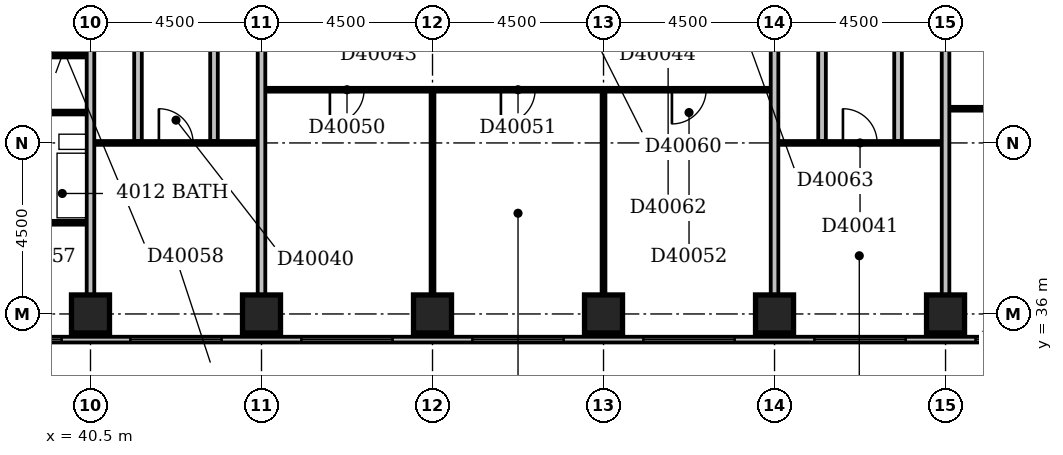
"""IFC4 building model, lengths in metres.
Left out: names, types, materials, properties, quantities, classifications, styles, units other than length and angle.
Written with IfcOpenShell. Run it as: python <this file> out.ifc"""

import sys

from ifc_helpers import new_model, si_unit, direction, frame, frame_2d, origin, origin_2d, place, context, subcontext, project, spatial, rectangle, extrude, element, fill, save


model = new_model("IFC4")
c1 = context("Model", 3, precision=1e-05, world=origin(), true_north=direction((0.0, 1.0)))
c2 = subcontext(c1, "Body", "Model", "MODEL_VIEW")
j1 = project(units=[si_unit("LENGTHUNIT", "METRE"), si_unit("PLANEANGLEUNIT", "RADIAN")], contexts=[c1])
p1 = place(None, origin())
s1 = spatial("IfcSite", under=j1, at=p1, CompositionType="ELEMENT")
p2 = place(p1, origin())
s2 = spatial("IfcBuilding", under=s1, at=p2, CompositionType="ELEMENT")
p3 = place(p2, frame((0.0, 0.0, 159.2)))
s3 = spatial("IfcBuildingStorey", under=s2, at=p3, CompositionType="ELEMENT", Elevation=159.2)
for number, where, z_axis, x_axis in (
    (1, (40.5, 36.0, -0.3), (0.0, 0.0, 1.0), (1.0, 0.0, 0.0)),
    (2, (45.0, 36.0, -0.3), (0.0, 0.0, 1.0), (1.0, 0.0, 0.0)),
    (3, (49.5, 36.0, -0.3), (0.0, 0.0, 1.0), (1.0, 0.0, 0.0)),
    (4, (54.0, 36.0, -0.3), (0.0, 0.0, 1.0), (1.0, 0.0, 0.0)),
    (5, (58.5, 36.0, -0.3), (0.0, 0.0, 1.0), (1.0, 0.0, 0.0)),
    (6, (63.0, 36.0, -0.3), (0.0, 0.0, 1.0), (1.0, 0.0, 0.0)),
):
    element("IfcColumn", number, at=place(p3, frame(where, z_axis=z_axis, x_axis=x_axis)), inside=s3, PredefinedType="COLUMN", context=c2, shape_type="SweptSolid", body=[
        extrude(rectangle(XDim=1.0, YDim=1.0, at=origin_2d()), origin(), (0.0, 0.0, 1.0), 3.6),
    ])
p4 = place(p3, frame((23.1, 35.325, 0.0), z_axis=(0.0, 0.0, 1.0), x_axis=(1.0, 0.0, 0.0)))
e7 = element("IfcWall", 7, at=p4, inside=s3, PredefinedType="STANDARD", context=c2, shape_type="SweptSolid", body=[
    extrude(rectangle(XDim=45.15, YDim=0.15, at=frame_2d((22.575, 0.0))), origin(), (0.0, 0.0, 1.0), 2.7),
])
p5 = place(p4, frame((0.45, 0.0, 0.6)))
e8 = element("IfcOpeningElement", 8, at=p5, cuts=e7, PredefinedType="OPENING", context=c2, shape_type="SweptSolid", body=[
    extrude(rectangle(XDim=2.4, YDim=1.8, at=frame_2d((1.2, 0.9))), frame((0.0, 0.087, 0.0), z_axis=(0.0, -1.0, 0.0), x_axis=(1.0, 0.0, 0.0)), (0.0, 0.0, 1.0), 0.174),
])
p6 = place(p4, frame((4.95, 0.0, 0.6)))
e9 = element("IfcOpeningElement", 9, at=p6, cuts=e7, PredefinedType="OPENING", context=c2, shape_type="SweptSolid", body=[
    extrude(rectangle(XDim=2.4, YDim=1.8, at=frame_2d((1.2, 0.9))), frame((0.0, 0.087, 0.0), z_axis=(0.0, -1.0, 0.0), x_axis=(1.0, 0.0, 0.0)), (0.0, 0.0, 1.0), 0.174),
])
p7 = place(p4, frame((9.22, 0.0, 0.6)))
e10 = element("IfcOpeningElement", 10, at=p7, cuts=e7, PredefinedType="OPENING", context=c2, shape_type="SweptSolid", body=[
    extrude(rectangle(XDim=1.8, YDim=1.8, at=frame_2d((0.9, 0.9))), frame((0.0, 0.087, 0.0), z_axis=(0.0, -1.0, 0.0), x_axis=(1.0, 0.0, 0.0)), (0.0, 0.0, 1.0), 0.174),
])
p8 = place(p4, frame((14.84, 0.0, 0.6)))
e11 = element("IfcOpeningElement", 11, at=p8, cuts=e7, PredefinedType="OPENING", context=c2, shape_type="SweptSolid", body=[
    extrude(rectangle(XDim=1.8, YDim=1.8, at=frame_2d((0.9, 0.9))), frame((0.0, 0.087, 0.0), z_axis=(0.0, -1.0, 0.0), x_axis=(1.0, 0.0, 0.0)), (0.0, 0.0, 1.0), 0.174),
])
p9 = place(p4, frame((18.45, 0.0, 0.6)))
e12 = element("IfcOpeningElement", 12, at=p9, cuts=e7, PredefinedType="OPENING", context=c2, shape_type="SweptSolid", body=[
    extrude(rectangle(XDim=2.4, YDim=1.8, at=frame_2d((1.2, 0.9))), frame((0.0, 0.087, 0.0), z_axis=(0.0, -1.0, 0.0), x_axis=(1.0, 0.0, 0.0)), (0.0, 0.0, 1.0), 0.174),
])
p10 = place(p4, frame((22.95, 0.0, 0.6)))
e13 = element("IfcOpeningElement", 13, at=p10, cuts=e7, PredefinedType="OPENING", context=c2, shape_type="SweptSolid", body=[
    extrude(rectangle(XDim=2.4, YDim=1.8, at=frame_2d((1.2, 0.9))), frame((0.0, 0.087, 0.0), z_axis=(0.0, -1.0, 0.0), x_axis=(1.0, 0.0, 0.0)), (0.0, 0.0, 1.0), 0.174),
])
p11 = place(p4, frame((27.45, 0.0, 0.6)))
e14 = element("IfcOpeningElement", 14, at=p11, cuts=e7, PredefinedType="OPENING", context=c2, shape_type="SweptSolid", body=[
    extrude(rectangle(XDim=2.4, YDim=1.8, at=frame_2d((1.2, 0.9))), frame((0.0, 0.087, 0.0), z_axis=(0.0, -1.0, 0.0), x_axis=(1.0, 0.0, 0.0)), (0.0, 0.0, 1.0), 0.174),
])
p12 = place(p4, frame((31.95, 0.0, 0.6)))
e15 = element("IfcOpeningElement", 15, at=p12, cuts=e7, PredefinedType="OPENING", context=c2, shape_type="SweptSolid", body=[
    extrude(rectangle(XDim=2.4, YDim=1.8, at=frame_2d((1.2, 0.9))), frame((0.0, 0.087, 0.0), z_axis=(0.0, -1.0, 0.0), x_axis=(1.0, 0.0, 0.0)), (0.0, 0.0, 1.0), 0.174),
])
p13 = place(p4, frame((36.45, 0.0, 0.6)))
e16 = element("IfcOpeningElement", 16, at=p13, cuts=e7, PredefinedType="OPENING", context=c2, shape_type="SweptSolid", body=[
    extrude(rectangle(XDim=2.4, YDim=1.8, at=frame_2d((1.2, 0.9))), frame((0.0, 0.087, 0.0), z_axis=(0.0, -1.0, 0.0), x_axis=(1.0, 0.0, 0.0)), (0.0, 0.0, 1.0), 0.174),
])
p14 = place(p4, frame((40.689, 0.0, 0.6)))
e17 = element("IfcOpeningElement", 17, at=p14, cuts=e7, PredefinedType="OPENING", context=c2, shape_type="SweptSolid", body=[
    extrude(rectangle(XDim=1.2, YDim=1.8, at=frame_2d((0.6, 0.9))), frame((0.0, 0.087, 0.0), z_axis=(0.0, -1.0, 0.0), x_axis=(1.0, 0.0, 0.0)), (0.0, 0.0, 1.0), 0.174),
])
p15 = place(p3, frame((40.5, 36.5, 0.0), z_axis=(0.0, 0.0, 1.0), x_axis=(0.0, 1.0, 0.0)))
e18 = element("IfcWall", 18, at=p15, inside=s3, PredefinedType="PARTITIONING", context=c2, shape_type="SweptSolid", body=[
    extrude(rectangle(XDim=12.9, YDim=0.2, at=frame_2d((6.45, 0.0))), origin(), (0.0, 0.0, 1.0), 3.3),
])
p16 = place(p3, frame((45.0, 36.5, 0.0), z_axis=(0.0, 0.0, 1.0), x_axis=(0.0, 1.0, 0.0)))
e19 = element("IfcWall", 19, at=p16, inside=s3, PredefinedType="PARTITIONING", context=c2, shape_type="SweptSolid", body=[
    extrude(rectangle(XDim=12.9, YDim=0.2, at=frame_2d((6.45, 0.0))), origin(), (0.0, 0.0, 1.0), 2.6),
])
p17 = place(p3, frame((49.5, 36.5, 0.0), z_axis=(0.0, 0.0, 1.0), x_axis=(0.0, 1.0, 0.0)))
e20 = element("IfcWall", 20, at=p17, inside=s3, PredefinedType="PARTITIONING", context=c2, shape_type="SweptSolid", body=[
    extrude(rectangle(XDim=5.35, YDim=0.1, at=frame_2d((2.675, 0.0))), origin(), (0.0, 0.0, 1.0), 3.3),
])
p18 = place(p3, frame((54.0, 36.5, 0.0), z_axis=(0.0, 0.0, 1.0), x_axis=(0.0, 1.0, 0.0)))
e21 = element("IfcWall", 21, at=p18, inside=s3, PredefinedType="PARTITIONING", context=c2, shape_type="SweptSolid", body=[
    extrude(rectangle(XDim=5.35, YDim=0.1, at=frame_2d((2.675, 0.0))), origin(), (0.0, 0.0, 1.0), 2.6),
])
p19 = place(p3, frame((58.5, 36.5, 0.0), z_axis=(0.0, 0.0, 1.0), x_axis=(0.0, 1.0, 0.0)))
e22 = element("IfcWall", 22, at=p19, inside=s3, PredefinedType="PARTITIONING", context=c2, shape_type="SweptSolid", body=[
    extrude(rectangle(XDim=12.9, YDim=0.2, at=frame_2d((6.45, 0.0))), origin(), (0.0, 0.0, 1.0), 3.3),
])
p20 = place(p3, frame((63.0, 36.5, 0.0), z_axis=(0.0, 0.0, 1.0), x_axis=(0.0, 1.0, 0.0)))
e23 = element("IfcWall", 23, at=p20, inside=s3, PredefinedType="PARTITIONING", context=c2, shape_type="SweptSolid", body=[
    extrude(rectangle(XDim=12.9, YDim=0.2, at=frame_2d((6.45, 0.0))), origin(), (0.0, 0.0, 1.0), 2.4),
])
p21 = place(p3, frame((38.25, 38.4, 0.0), z_axis=(0.0, 0.0, 1.0), x_axis=(1.0, 0.0, 0.0)))
e24 = element("IfcWall", 24, at=p21, inside=s3, PredefinedType="PLUMBINGWALL", context=c2, shape_type="SweptSolid", body=[
    extrude(rectangle(XDim=2.15, YDim=0.1, at=frame_2d((1.075, 0.0))), origin(), (0.0, 0.0, 1.0), 3.3),
])
p22 = place(p3, frame((40.6, 40.5, 0.0), z_axis=(0.0, 0.0, 1.0), x_axis=(1.0, 0.0, 0.0)))
e25 = element("IfcWall", 25, at=p22, inside=s3, PredefinedType="PARTITIONING", context=c2, shape_type="SweptSolid", body=[
    extrude(rectangle(XDim=4.3, YDim=0.1, at=frame_2d((2.15, 0.0))), origin(), (0.0, 0.0, 1.0), 3.3),
])
p23 = place(p22, frame((1.7, 0.0, 0.0)))
e26 = element("IfcOpeningElement", 26, at=p23, cuts=e25, PredefinedType="OPENING", context=c2, shape_type="SweptSolid", body=[
    extrude(rectangle(XDim=0.9, YDim=2.1, at=frame_2d((0.45, 1.05))), frame((0.0, 0.062, 0.0), z_axis=(0.0, -1.0, 0.0), x_axis=(1.0, 0.0, 0.0)), (0.0, 0.0, 1.0), 0.124),
])
p24 = place(p3, frame((58.6, 40.5, 0.0), z_axis=(0.0, 0.0, 1.0), x_axis=(1.0, 0.0, 0.0)))
e27 = element("IfcWall", 27, at=p24, inside=s3, PredefinedType="PARTITIONING", context=c2, shape_type="SweptSolid", body=[
    extrude(rectangle(XDim=4.3, YDim=0.1, at=frame_2d((2.15, 0.0))), origin(), (0.0, 0.0, 1.0), 3.3),
])
p25 = place(p24, frame((1.7, 0.0, 0.0)))
e28 = element("IfcOpeningElement", 28, at=p25, cuts=e27, PredefinedType="OPENING", context=c2, shape_type="SweptSolid", body=[
    extrude(rectangle(XDim=0.9, YDim=2.1, at=frame_2d((0.45, 1.05))), frame((0.0, 0.062, 0.0), z_axis=(0.0, -1.0, 0.0), x_axis=(1.0, 0.0, 0.0)), (0.0, 0.0, 1.0), 0.124),
])
p26 = place(p3, frame((41.75, 40.55, 0.0), z_axis=(0.0, 0.0, 1.0), x_axis=(0.0, 1.0, 0.0)))
e29 = element("IfcWall", 29, at=p26, inside=s3, PredefinedType="PARTITIONING", context=c2, shape_type="SweptSolid", body=[
    extrude(rectangle(XDim=8.95, YDim=0.2, at=frame_2d((4.475, 0.0))), origin(), (0.0, 0.0, 1.0), 3.3),
])
p27 = place(p26, frame((5.55, 0.0, 0.0)))
e30 = element("IfcOpeningElement", 30, at=p27, cuts=e29, PredefinedType="OPENING", context=c2, shape_type="SweptSolid", body=[
    extrude(rectangle(XDim=0.8, YDim=2.1, at=frame_2d((0.4, 1.05))), frame((0.0, 0.112, 0.0), z_axis=(0.0, -1.0, 0.0), x_axis=(1.0, 0.0, 0.0)), (0.0, 0.0, 1.0), 0.224),
])
p28 = place(p3, frame((43.75, 40.55, 0.0), z_axis=(0.0, 0.0, 1.0), x_axis=(0.0, 1.0, 0.0)))
e31 = element("IfcWall", 31, at=p28, inside=s3, PredefinedType="PARTITIONING", context=c2, shape_type="SweptSolid", body=[
    extrude(rectangle(XDim=8.95, YDim=0.2, at=frame_2d((4.475, 0.0))), origin(), (0.0, 0.0, 1.0), 3.3),
])
p29 = place(p28, frame((5.55, 0.0, 0.0)))
e32 = element("IfcOpeningElement", 32, at=p29, cuts=e31, PredefinedType="OPENING", context=c2, shape_type="SweptSolid", body=[
    extrude(rectangle(XDim=0.8, YDim=2.1, at=frame_2d((0.4, 1.05))), frame((0.0, 0.112, 0.0), z_axis=(0.0, -1.0, 0.0), x_axis=(1.0, 0.0, 0.0)), (0.0, 0.0, 1.0), 0.224),
])
p30 = place(p3, frame((59.75, 40.55, 0.0), z_axis=(0.0, 0.0, 1.0), x_axis=(0.0, 1.0, 0.0)))
e33 = element("IfcWall", 33, at=p30, inside=s3, PredefinedType="PARTITIONING", context=c2, shape_type="SweptSolid", body=[
    extrude(rectangle(XDim=8.95, YDim=0.2, at=frame_2d((4.475, 0.0))), origin(), (0.0, 0.0, 1.0), 3.3),
])
p31 = place(p30, frame((5.55, 0.0, 0.0)))
e34 = element("IfcOpeningElement", 34, at=p31, cuts=e33, PredefinedType="OPENING", context=c2, shape_type="SweptSolid", body=[
    extrude(rectangle(XDim=0.8, YDim=2.1, at=frame_2d((0.4, 1.05))), frame((0.0, 0.112, 0.0), z_axis=(0.0, -1.0, 0.0), x_axis=(1.0, 0.0, 0.0)), (0.0, 0.0, 1.0), 0.224),
])
p32 = place(p3, frame((61.75, 40.55, 0.0), z_axis=(0.0, 0.0, 1.0), x_axis=(0.0, 1.0, 0.0)))
e35 = element("IfcWall", 35, at=p32, inside=s3, PredefinedType="PARTITIONING", context=c2, shape_type="SweptSolid", body=[
    extrude(rectangle(XDim=8.95, YDim=0.2, at=frame_2d((4.475, 0.0))), origin(), (0.0, 0.0, 1.0), 3.3),
])
p33 = place(p32, frame((5.55, 0.0, 0.0)))
e36 = element("IfcOpeningElement", 36, at=p33, cuts=e35, PredefinedType="OPENING", context=c2, shape_type="SweptSolid", body=[
    extrude(rectangle(XDim=0.8, YDim=2.1, at=frame_2d((0.4, 1.05))), frame((0.0, 0.112, 0.0), z_axis=(0.0, -1.0, 0.0), x_axis=(1.0, 0.0, 0.0)), (0.0, 0.0, 1.0), 0.224),
])
p34 = place(p3, frame((22.6, 41.3, 0.0), z_axis=(0.0, 0.0, 1.0), x_axis=(1.0, 0.0, 0.0)))
e37 = element("IfcWall", 37, at=p34, inside=s3, PredefinedType="PARTITIONING", context=c2, shape_type="SweptSolid", body=[
    extrude(rectangle(XDim=17.8, YDim=0.1, at=frame_2d((8.9, 0.0))), origin(), (0.0, 0.0, 1.0), 3.3),
])
p35 = place(p34, frame((3.9, 0.0, 0.0)))
e38 = element("IfcOpeningElement", 38, at=p35, cuts=e37, PredefinedType="OPENING", context=c2, shape_type="SweptSolid", body=[
    extrude(rectangle(XDim=0.9, YDim=2.1, at=frame_2d((0.45, 1.05))), frame((0.0, 0.062, 0.0), z_axis=(0.0, -1.0, 0.0), x_axis=(1.0, 0.0, 0.0)), (0.0, 0.0, 1.0), 0.124),
])
p36 = place(p34, frame((10.7, 0.0, 0.0)))
e39 = element("IfcOpeningElement", 39, at=p36, cuts=e37, PredefinedType="OPENING", context=c2, shape_type="SweptSolid", body=[
    extrude(rectangle(XDim=0.9, YDim=2.1, at=frame_2d((0.45, 1.05))), frame((0.0, 0.062, 0.0), z_axis=(0.0, -1.0, 0.0), x_axis=(1.0, 0.0, 0.0)), (0.0, 0.0, 1.0), 0.124),
])
p37 = place(p34, frame((14.05, 0.0, 0.0)))
e40 = element("IfcOpeningElement", 40, at=p37, cuts=e37, PredefinedType="OPENING", context=c2, shape_type="SweptSolid", body=[
    extrude(rectangle(XDim=0.9, YDim=2.1, at=frame_2d((0.45, 1.05))), frame((0.0, 0.062, 0.0), z_axis=(0.0, -1.0, 0.0), x_axis=(1.0, 0.0, 0.0)), (0.0, 0.0, 1.0), 0.124),
])
p38 = place(p3, frame((63.1, 41.4, 0.0), z_axis=(0.0, 0.0, 1.0), x_axis=(1.0, 0.0, 0.0)))
e41 = element("IfcWall", 41, at=p38, inside=s3, PredefinedType="PARTITIONING", context=c2, shape_type="SweptSolid", body=[
    extrude(rectangle(XDim=5.0, YDim=0.1, at=frame_2d((2.5, 0.0))), origin(), (0.0, 0.0, 1.0), 3.3),
])
p39 = place(p38, frame((1.7, 0.0, 0.0)))
e42 = element("IfcOpeningElement", 42, at=p39, cuts=e41, PredefinedType="OPENING", context=c2, shape_type="SweptSolid", body=[
    extrude(rectangle(XDim=0.9, YDim=2.1, at=frame_2d((0.45, 1.05))), frame((0.0, 0.062, 0.0), z_axis=(0.0, -1.0, 0.0), x_axis=(1.0, 0.0, 0.0)), (0.0, 0.0, 1.0), 0.124),
])
p40 = place(p3, frame((45.1, 41.9, 0.0), z_axis=(0.0, 0.0, 1.0), x_axis=(1.0, 0.0, 0.0)))
e43 = element("IfcWall", 43, at=p40, inside=s3, PredefinedType="PARTITIONING", context=c2, shape_type="SweptSolid", body=[
    extrude(rectangle(XDim=13.3, YDim=0.1, at=frame_2d((6.65, 0.0))), origin(), (0.0, 0.0, 1.0), 3.3),
])
p41 = place(p40, frame((1.7, 0.0, 0.0)))
e44 = element("IfcOpeningElement", 44, at=p41, cuts=e43, PredefinedType="OPENING", context=c2, shape_type="SweptSolid", body=[
    extrude(rectangle(XDim=0.9, YDim=2.1, at=frame_2d((0.45, 1.05))), frame((0.0, 0.062, 0.0), z_axis=(0.0, -1.0, 0.0), x_axis=(1.0, 0.0, 0.0)), (0.0, 0.0, 1.0), 0.124),
])
p42 = place(p40, frame((6.2, 0.0, 0.0)))
e45 = element("IfcOpeningElement", 45, at=p42, cuts=e43, PredefinedType="OPENING", context=c2, shape_type="SweptSolid", body=[
    extrude(rectangle(XDim=0.9, YDim=2.1, at=frame_2d((0.45, 1.05))), frame((0.0, 0.062, 0.0), z_axis=(0.0, -1.0, 0.0), x_axis=(1.0, 0.0, 0.0)), (0.0, 0.0, 1.0), 0.124),
])
p43 = place(p40, frame((10.7, 0.0, 0.0)))
e46 = element("IfcOpeningElement", 46, at=p43, cuts=e43, PredefinedType="OPENING", context=c2, shape_type="SweptSolid", body=[
    extrude(rectangle(XDim=0.9, YDim=2.1, at=frame_2d((0.45, 1.05))), frame((0.0, 0.062, 0.0), z_axis=(0.0, -1.0, 0.0), x_axis=(1.0, 0.0, 0.0)), (0.0, 0.0, 1.0), 0.124),
])
p44 = place(p3, frame((29.25, 42.8, 0.0), z_axis=(0.0, 0.0, 1.0), x_axis=(1.0, 0.0, 0.0)))
e47 = element("IfcWall", 47, at=p44, inside=s3, PredefinedType="PARTITIONING", context=c2, shape_type="SweptSolid", body=[
    extrude(rectangle(XDim=11.15, YDim=0.1, at=frame_2d((5.575, 0.0))), origin(), (0.0, 0.0, 1.0), 3.3),
])
p45 = place(p44, frame((0.75, 0.0, 0.0)))
e48 = element("IfcOpeningElement", 48, at=p45, cuts=e47, PredefinedType="OPENING", context=c2, shape_type="SweptSolid", body=[
    extrude(rectangle(XDim=0.8, YDim=2.1, at=frame_2d((0.4, 1.05))), frame((0.0, 0.062, 0.0), z_axis=(0.0, -1.0, 0.0), x_axis=(1.0, 0.0, 0.0)), (0.0, 0.0, 1.0), 0.124),
])
p46 = place(p44, frame((8.05, 0.0, 0.0)))
e49 = element("IfcOpeningElement", 49, at=p46, cuts=e47, PredefinedType="OPENING", context=c2, shape_type="SweptSolid", body=[
    extrude(rectangle(XDim=0.8, YDim=2.1, at=frame_2d((0.4, 1.05))), frame((0.0, 0.062, 0.0), z_axis=(0.0, -1.0, 0.0), x_axis=(1.0, 0.0, 0.0)), (0.0, 0.0, 1.0), 0.124),
])
p47 = place(p44, frame((4.25, 0.0, 0.0)))
e50 = element("IfcOpeningElement", 50, at=p47, cuts=e47, PredefinedType="OPENING", context=c2, shape_type="SweptSolid", body=[
    extrude(rectangle(XDim=0.8, YDim=2.1, at=frame_2d((0.4, 1.05))), frame((0.0, 0.062, 0.0), z_axis=(0.0, -1.0, 0.0), x_axis=(1.0, 0.0, 0.0)), (0.0, 0.0, 1.0), 0.124),
])
p48 = place(p44, frame((6.05, 0.0, 0.0)))
e51 = element("IfcOpeningElement", 51, at=p48, cuts=e47, PredefinedType="OPENING", context=c2, shape_type="SweptSolid", body=[
    extrude(rectangle(XDim=0.8, YDim=2.1, at=frame_2d((0.4, 1.05))), frame((0.0, 0.062, 0.0), z_axis=(0.0, -1.0, 0.0), x_axis=(1.0, 0.0, 0.0)), (0.0, 0.0, 1.0), 0.124),
])
p49 = place(p44, frame((9.95, 0.0, 0.0)))
e52 = element("IfcOpeningElement", 52, at=p49, cuts=e47, PredefinedType="OPENING", context=c2, shape_type="SweptSolid", body=[
    extrude(rectangle(XDim=0.8, YDim=2.1, at=frame_2d((0.4, 1.05))), frame((0.0, 0.062, 0.0), z_axis=(0.0, -1.0, 0.0), x_axis=(1.0, 0.0, 0.0)), (0.0, 0.0, 1.0), 0.124),
])
p50 = place(p44, frame((2.7, 0.0, 0.0)))
e53 = element("IfcOpeningElement", 53, at=p50, cuts=e47, PredefinedType="OPENING", context=c2, shape_type="SweptSolid", body=[
    extrude(rectangle(XDim=0.8, YDim=2.1, at=frame_2d((0.4, 1.05))), frame((0.0, 0.062, 0.0), z_axis=(0.0, -1.0, 0.0), x_axis=(1.0, 0.0, 0.0)), (0.0, 0.0, 1.0), 0.124),
])
p51 = place(p8, origin())
e54 = element("IfcWindow", 54, at=p51, inside=s3, PartitioningType="SINGLE_PANEL", PredefinedType="WINDOW", context=c2, shape_type="SweptSolid", body=[
    extrude(rectangle(XDim=1.8, YDim=1.8, at=frame_2d((0.9, 0.9))), frame((0.0, 0.03, 0.0), z_axis=(0.0, -1.0, 0.0), x_axis=(1.0, 0.0, 0.0)), (0.0, 0.0, 1.0), 0.06),
])
fill(e11, e54)
p52 = place(p9, origin())
e55 = element("IfcWindow", 55, at=p52, inside=s3, PartitioningType="SINGLE_PANEL", PredefinedType="WINDOW", context=c2, shape_type="SweptSolid", body=[
    extrude(rectangle(XDim=2.4, YDim=1.8, at=frame_2d((1.2, 0.9))), frame((0.0, 0.03, 0.0), z_axis=(0.0, -1.0, 0.0), x_axis=(1.0, 0.0, 0.0)), (0.0, 0.0, 1.0), 0.06),
])
fill(e12, e55)
p53 = place(p10, origin())
e56 = element("IfcWindow", 56, at=p53, inside=s3, PartitioningType="SINGLE_PANEL", PredefinedType="WINDOW", context=c2, shape_type="SweptSolid", body=[
    extrude(rectangle(XDim=2.4, YDim=1.8, at=frame_2d((1.2, 0.9))), frame((0.0, 0.03, 0.0), z_axis=(0.0, -1.0, 0.0), x_axis=(1.0, 0.0, 0.0)), (0.0, 0.0, 1.0), 0.06),
])
fill(e13, e56)
p54 = place(p11, origin())
e57 = element("IfcWindow", 57, at=p54, inside=s3, PartitioningType="SINGLE_PANEL", PredefinedType="WINDOW", context=c2, shape_type="SweptSolid", body=[
    extrude(rectangle(XDim=2.4, YDim=1.8, at=frame_2d((1.2, 0.9))), frame((0.0, 0.03, 0.0), z_axis=(0.0, -1.0, 0.0), x_axis=(1.0, 0.0, 0.0)), (0.0, 0.0, 1.0), 0.06),
])
fill(e14, e57)
p55 = place(p12, origin())
e58 = element("IfcWindow", 58, at=p55, inside=s3, PartitioningType="SINGLE_PANEL", PredefinedType="WINDOW", context=c2, shape_type="SweptSolid", body=[
    extrude(rectangle(XDim=2.4, YDim=1.8, at=frame_2d((1.2, 0.9))), frame((0.0, 0.03, 0.0), z_axis=(0.0, -1.0, 0.0), x_axis=(1.0, 0.0, 0.0)), (0.0, 0.0, 1.0), 0.06),
])
fill(e15, e58)
p56 = place(p13, origin())
e59 = element("IfcWindow", 59, at=p56, inside=s3, PartitioningType="SINGLE_PANEL", PredefinedType="WINDOW", context=c2, shape_type="SweptSolid", body=[
    extrude(rectangle(XDim=2.4, YDim=1.8, at=frame_2d((1.2, 0.9))), frame((0.0, 0.03, 0.0), z_axis=(0.0, -1.0, 0.0), x_axis=(1.0, 0.0, 0.0)), (0.0, 0.0, 1.0), 0.06),
])
fill(e16, e59)
p57 = place(p14, origin())
e60 = element("IfcWindow", 60, at=p57, inside=s3, PartitioningType="SINGLE_PANEL", PredefinedType="WINDOW", context=c2, shape_type="SweptSolid", body=[
    extrude(rectangle(XDim=1.2, YDim=1.8, at=frame_2d((0.6, 0.9))), frame((0.0, 0.03, 0.0), z_axis=(0.0, -1.0, 0.0), x_axis=(1.0, 0.0, 0.0)), (0.0, 0.0, 1.0), 0.06),
])
fill(e17, e60)
p58 = place(p23, origin())
e61 = element("IfcDoor", 61, at=p58, inside=s3, OperationType="SINGLE_SWING_LEFT", PredefinedType="DOOR", context=c2, shape_type="SweptSolid", body=[
    extrude(rectangle(XDim=0.9, YDim=2.1, at=frame_2d((0.45, 1.05))), frame((0.0, 0.025, 0.0), z_axis=(0.0, -1.0, 0.0), x_axis=(1.0, 0.0, 0.0)), (0.0, 0.0, 1.0), 0.05),
])
fill(e26, e61)
p59 = place(p25, origin())
e62 = element("IfcDoor", 62, at=p59, inside=s3, OperationType="SINGLE_SWING_LEFT", PredefinedType="DOOR", context=c2, shape_type="SweptSolid", body=[
    extrude(rectangle(XDim=0.9, YDim=2.1, at=frame_2d((0.45, 1.05))), frame((0.0, 0.025, 0.0), z_axis=(0.0, -1.0, 0.0), x_axis=(1.0, 0.0, 0.0)), (0.0, 0.0, 1.0), 0.05),
])
fill(e28, e62)
p60 = place(p41, frame((0.9, 0.0, 0.0), z_axis=(0.0, 0.0, 1.0), x_axis=(-1.0, 0.0, 0.0)))
e63 = element("IfcDoor", 63, at=p60, inside=s3, OperationType="SINGLE_SWING_RIGHT", PredefinedType="DOOR", context=c2, shape_type="SweptSolid", body=[
    extrude(rectangle(XDim=0.9, YDim=2.1, at=frame_2d((0.45, 1.05))), frame((0.0, 0.025, 0.0), z_axis=(0.0, -1.0, 0.0), x_axis=(1.0, 0.0, 0.0)), (0.0, 0.0, 1.0), 0.05),
])
fill(e44, e63)
p61 = place(p42, frame((0.9, 0.0, 0.0), z_axis=(0.0, 0.0, 1.0), x_axis=(-1.0, 0.0, 0.0)))
e64 = element("IfcDoor", 64, at=p61, inside=s3, OperationType="SINGLE_SWING_RIGHT", PredefinedType="DOOR", context=c2, shape_type="SweptSolid", body=[
    extrude(rectangle(XDim=0.9, YDim=2.1, at=frame_2d((0.45, 1.05))), frame((0.0, 0.025, 0.0), z_axis=(0.0, -1.0, 0.0), x_axis=(1.0, 0.0, 0.0)), (0.0, 0.0, 1.0), 0.05),
])
fill(e45, e64)
p62 = place(p43, frame((0.9, 0.0, 0.0), z_axis=(0.0, 0.0, 1.0), x_axis=(-1.0, 0.0, 0.0)))
e65 = element("IfcDoor", 65, at=p62, inside=s3, OperationType="SINGLE_SWING_RIGHT", PredefinedType="DOOR", context=c2, shape_type="SweptSolid", body=[
    extrude(rectangle(XDim=0.9, YDim=2.1, at=frame_2d((0.45, 1.05))), frame((0.0, 0.025, 0.0), z_axis=(0.0, -1.0, 0.0), x_axis=(1.0, 0.0, 0.0)), (0.0, 0.0, 1.0), 0.05),
])
fill(e46, e65)
p63 = place(p49, origin())
e66 = element("IfcDoor", 66, at=p63, inside=s3, OperationType="SINGLE_SWING_LEFT", PredefinedType="DOOR", context=c2, shape_type="SweptSolid", body=[
    extrude(rectangle(XDim=0.8, YDim=2.1, at=frame_2d((0.4, 1.05))), frame((0.0, 0.025, 0.0), z_axis=(0.0, -1.0, 0.0), x_axis=(1.0, 0.0, 0.0)), (0.0, 0.0, 1.0), 0.05),
])
fill(e52, e66)
save(model, sys.argv[1])
